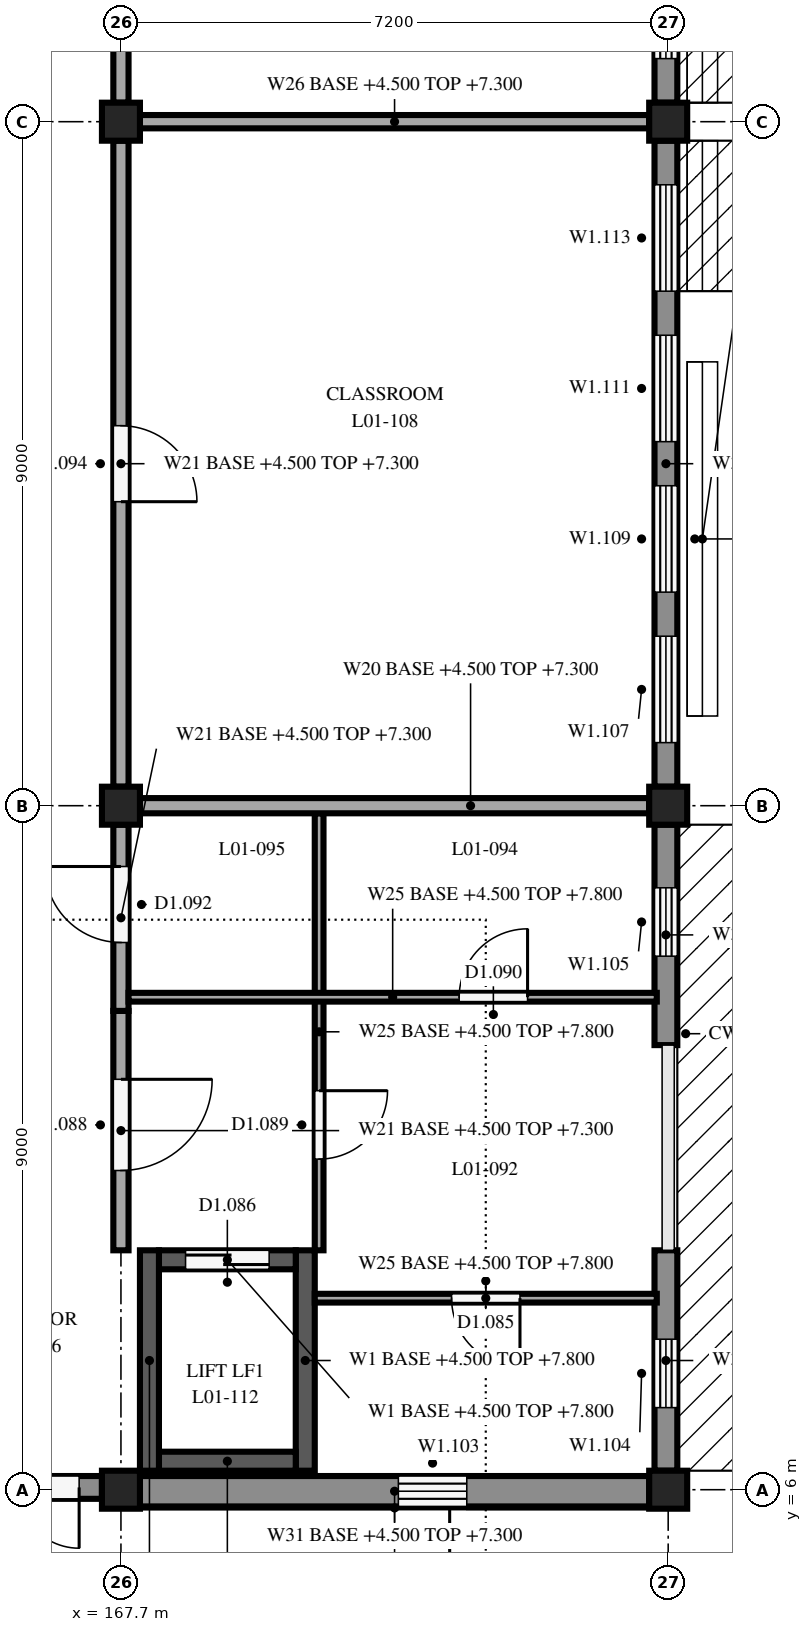
"""IFC4 building model, lengths in metres.
Left out: names, types, materials, properties, quantities, classifications, styles, units other than length and angle.
Written with IfcOpenShell. Run it as: python <this file> out.ifc"""

import sys

from ifc_helpers import new_model, si_unit, direction, frame, frame_2d, origin, origin_2d, place, context, subcontext, project, spatial, rectangle, extrude, element, fill, save


model = new_model("IFC4")
c1 = context("Model", 3, precision=1e-05, world=origin(), true_north=direction((0.0, 1.0)))
c2 = subcontext(c1, "Body", "Model", "MODEL_VIEW")
j1 = project(units=[si_unit("LENGTHUNIT", "METRE"), si_unit("PLANEANGLEUNIT", "RADIAN")], contexts=[c1])
p1 = place(None, origin())
s1 = spatial("IfcSite", under=j1, at=p1, CompositionType="ELEMENT")
p2 = place(p1, origin())
s2 = spatial("IfcBuilding", under=s1, at=p2, CompositionType="ELEMENT")
p3 = place(p2, frame((0.0, 0.0, 4.5)))
s3 = spatial("IfcBuildingStorey", under=s2, at=p3, CompositionType="ELEMENT", Elevation=4.5)
for number, where, z_axis, x_axis in (
    (1, (167.7, 6.0, 0.0), (0.0, 0.0, 1.0), (1.0, 0.0, 0.0)),
    (2, (167.7, 15.0, 0.0), (0.0, 0.0, 1.0), (1.0, 0.0, 0.0)),
    (3, (167.7, 24.0, 0.0), (0.0, 0.0, 1.0), (1.0, 0.0, 0.0)),
    (4, (174.9, 6.0, 0.0), (0.0, 0.0, 1.0), (1.0, 0.0, 0.0)),
    (5, (174.9, 15.0, 0.0), (0.0, 0.0, 1.0), (1.0, 0.0, 0.0)),
    (6, (174.9, 24.0, 0.0), (0.0, 0.0, 1.0), (1.0, 0.0, 0.0)),
):
    element("IfcColumn", number, at=place(p3, frame(where, z_axis=z_axis, x_axis=x_axis)), inside=s3, PredefinedType="COLUMN", context=c2, shape_type="SweptSolid", body=[
        extrude(rectangle(XDim=0.5, YDim=0.5, at=origin_2d()), origin(), (0.0, 0.0, 1.0), 3.3),
    ])
for number, where, z_axis, x_axis in (
    (7, (168.075, 6.25, 0.0), (0.0, 0.0, 1.0), (0.0, 1.0, 0.0)),
    (8, (170.125, 6.25, 0.0), (0.0, 0.0, 1.0), (0.0, 1.0, 0.0)),
):
    element("IfcWall", number, at=place(p3, frame(where, z_axis=z_axis, x_axis=x_axis)), inside=s3, PredefinedType="SHEAR", context=c2, shape_type="SweptSolid", body=[
        extrude(rectangle(XDim=2.9, YDim=0.25, at=frame_2d((1.45, 0.0))), origin(), (0.0, 0.0, 1.0), 3.3),
    ])
p4 = place(p3, frame((168.2, 6.375, 0.0), z_axis=(0.0, 0.0, 1.0), x_axis=(1.0, 0.0, 0.0)))
e9 = element("IfcWall", 9, at=p4, inside=s3, PredefinedType="SHEAR", context=c2, shape_type="SweptSolid", body=[
    extrude(rectangle(XDim=1.8, YDim=0.25, at=frame_2d((0.9, 0.0))), origin(), (0.0, 0.0, 1.0), 3.3),
])
p5 = place(p3, frame((168.2, 9.025, 0.0), z_axis=(0.0, 0.0, 1.0), x_axis=(1.0, 0.0, 0.0)))
e10 = element("IfcWall", 10, at=p5, inside=s3, PredefinedType="SHEAR", context=c2, shape_type="SweptSolid", body=[
    extrude(rectangle(XDim=1.8, YDim=0.25, at=frame_2d((0.9, 0.0))), origin(), (0.0, 0.0, 1.0), 3.3),
])
p6 = place(p5, frame((0.35, 0.0, 0.0)))
e11 = element("IfcOpeningElement", 11, at=p6, cuts=e10, PredefinedType="OPENING", context=c2, shape_type="SweptSolid", body=[
    extrude(rectangle(XDim=1.1, YDim=2.1, at=frame_2d((0.55, 1.05))), frame((0.0, 0.135, 0.0), z_axis=(0.0, -1.0, 0.0), x_axis=(1.0, 0.0, 0.0)), (0.0, 0.0, 1.0), 0.27),
])
p7 = place(p3, frame((174.87, 9.15, 0.0), z_axis=(0.0, 0.0, 1.0), x_axis=(0.0, -1.0, 0.0)))
e12 = element("IfcWall", 12, at=p7, inside=s3, PredefinedType="STANDARD", context=c2, shape_type="SweptSolid", body=[
    extrude(rectangle(XDim=2.9, YDim=0.3, at=frame_2d((1.45, 0.0))), origin(), (0.0, 0.0, 1.0), 2.75),
])
p8 = place(p7, frame((1.17, 0.0, 1.6)))
e13 = element("IfcOpeningElement", 13, at=p8, cuts=e12, PredefinedType="OPENING", context=c2, shape_type="SweptSolid", body=[
    extrude(rectangle(XDim=0.9, YDim=1.0, at=frame_2d((0.45, 0.5))), frame((0.0, 0.16, 0.0), z_axis=(0.0, -1.0, 0.0), x_axis=(1.0, 0.0, 0.0)), (0.0, 0.0, 1.0), 0.32),
])
p9 = place(p3, frame((174.87, 14.75, 0.0), z_axis=(0.0, 0.0, 1.0), x_axis=(0.0, -1.0, 0.0)))
e14 = element("IfcWall", 14, at=p9, inside=s3, PredefinedType="STANDARD", context=c2, shape_type="SweptSolid", body=[
    extrude(rectangle(XDim=2.9, YDim=0.3, at=frame_2d((1.45, 0.0))), origin(), (0.0, 0.0, 1.0), 2.75),
])
p10 = place(p9, frame((0.83, 0.0, 1.6)))
e15 = element("IfcOpeningElement", 15, at=p10, cuts=e14, PredefinedType="OPENING", context=c2, shape_type="SweptSolid", body=[
    extrude(rectangle(XDim=0.9, YDim=1.0, at=frame_2d((0.45, 0.5))), frame((0.0, 0.16, 0.0), z_axis=(0.0, -1.0, 0.0), x_axis=(1.0, 0.0, 0.0)), (0.0, 0.0, 1.0), 0.32),
])
p11 = place(p3, frame((174.87, 23.75, 0.0), z_axis=(0.0, 0.0, 1.0), x_axis=(0.0, -1.0, 0.0)))
e16 = element("IfcWall", 16, at=p11, inside=s3, PredefinedType="STANDARD", context=c2, shape_type="SweptSolid", body=[
    extrude(rectangle(XDim=8.5, YDim=0.3, at=frame_2d((4.25, 0.0))), origin(), (0.0, 0.0, 1.0), 2.75),
])
p12 = place(p11, frame((6.52, 0.0, 0.6)))
e17 = element("IfcOpeningElement", 17, at=p12, cuts=e16, PredefinedType="OPENING", context=c2, shape_type="SweptSolid", body=[
    extrude(rectangle(XDim=1.4, YDim=2.1, at=frame_2d((0.7, 1.05))), frame((0.0, 0.16, 0.0), z_axis=(0.0, -1.0, 0.0), x_axis=(1.0, 0.0, 0.0)), (0.0, 0.0, 1.0), 0.32),
])
p13 = place(p11, frame((4.54, 0.0, 0.6)))
e18 = element("IfcOpeningElement", 18, at=p13, cuts=e16, PredefinedType="OPENING", context=c2, shape_type="SweptSolid", body=[
    extrude(rectangle(XDim=1.4, YDim=2.1, at=frame_2d((0.7, 1.05))), frame((0.0, 0.16, 0.0), z_axis=(0.0, -1.0, 0.0), x_axis=(1.0, 0.0, 0.0)), (0.0, 0.0, 1.0), 0.32),
])
p14 = place(p11, frame((2.56, 0.0, 0.6)))
e19 = element("IfcOpeningElement", 19, at=p14, cuts=e16, PredefinedType="OPENING", context=c2, shape_type="SweptSolid", body=[
    extrude(rectangle(XDim=1.4, YDim=2.1, at=frame_2d((0.7, 1.05))), frame((0.0, 0.16, 0.0), z_axis=(0.0, -1.0, 0.0), x_axis=(1.0, 0.0, 0.0)), (0.0, 0.0, 1.0), 0.32),
])
p15 = place(p11, frame((0.58, 0.0, 0.6)))
e20 = element("IfcOpeningElement", 20, at=p15, cuts=e16, PredefinedType="OPENING", context=c2, shape_type="SweptSolid", body=[
    extrude(rectangle(XDim=1.4, YDim=2.1, at=frame_2d((0.7, 1.05))), frame((0.0, 0.16, 0.0), z_axis=(0.0, -1.0, 0.0), x_axis=(1.0, 0.0, 0.0)), (0.0, 0.0, 1.0), 0.32),
])
p16 = place(p3, frame((174.87, 32.75, 0.0), z_axis=(0.0, 0.0, 1.0), x_axis=(0.0, -1.0, 0.0)))
e21 = element("IfcWall", 21, at=p16, inside=s3, PredefinedType="STANDARD", context=c2, shape_type="SweptSolid", body=[
    extrude(rectangle(XDim=8.5, YDim=0.3, at=frame_2d((4.25, 0.0))), origin(), (0.0, 0.0, 1.0), 2.75),
])
p17 = place(p16, frame((6.52, 0.0, 0.3)))
e22 = element("IfcOpeningElement", 22, at=p17, cuts=e21, PredefinedType="OPENING", context=c2, shape_type="SweptSolid", body=[
    extrude(rectangle(XDim=1.4, YDim=2.4, at=frame_2d((0.7, 1.2))), frame((0.0, 0.16, 0.0), z_axis=(0.0, -1.0, 0.0), x_axis=(1.0, 0.0, 0.0)), (0.0, 0.0, 1.0), 0.32),
])
p18 = place(p16, frame((4.54, 0.0, 0.3)))
e23 = element("IfcOpeningElement", 23, at=p18, cuts=e21, PredefinedType="OPENING", context=c2, shape_type="SweptSolid", body=[
    extrude(rectangle(XDim=1.4, YDim=2.4, at=frame_2d((0.7, 1.2))), frame((0.0, 0.16, 0.0), z_axis=(0.0, -1.0, 0.0), x_axis=(1.0, 0.0, 0.0)), (0.0, 0.0, 1.0), 0.32),
])
p19 = place(p16, frame((2.56, 0.0, 0.3)))
e24 = element("IfcOpeningElement", 24, at=p19, cuts=e21, PredefinedType="OPENING", context=c2, shape_type="SweptSolid", body=[
    extrude(rectangle(XDim=1.4, YDim=2.4, at=frame_2d((0.7, 1.2))), frame((0.0, 0.16, 0.0), z_axis=(0.0, -1.0, 0.0), x_axis=(1.0, 0.0, 0.0)), (0.0, 0.0, 1.0), 0.32),
])
p20 = place(p16, frame((0.58, 0.0, 0.3)))
e25 = element("IfcOpeningElement", 25, at=p20, cuts=e21, PredefinedType="OPENING", context=c2, shape_type="SweptSolid", body=[
    extrude(rectangle(XDim=1.4, YDim=2.4, at=frame_2d((0.7, 1.2))), frame((0.0, 0.16, 0.0), z_axis=(0.0, -1.0, 0.0), x_axis=(1.0, 0.0, 0.0)), (0.0, 0.0, 1.0), 0.32),
])
p21 = place(p3, frame((167.45, 6.03, 0.0), z_axis=(0.0, 0.0, 1.0), x_axis=(-1.0, 0.0, 0.0)))
e26 = element("IfcWall", 26, at=p21, inside=s3, PredefinedType="STANDARD", context=c2, shape_type="SweptSolid", body=[
    extrude(rectangle(XDim=2.2, YDim=0.3, at=frame_2d((1.1, 0.0))), origin(), (0.0, 0.0, 1.0), 2.9),
])
p22 = place(p21, frame((0.3, 0.0, 0.0)))
e27 = element("IfcOpeningElement", 27, at=p22, cuts=e26, PredefinedType="OPENING", context=c2, shape_type="SweptSolid", body=[
    extrude(rectangle(XDim=1.6, YDim=2.4, at=frame_2d((0.8, 1.2))), frame((0.0, 0.16, 0.0), z_axis=(0.0, -1.0, 0.0), x_axis=(1.0, 0.0, 0.0)), (0.0, 0.0, 1.0), 0.32),
])
p23 = place(p3, frame((174.65, 5.98, 0.0), z_axis=(0.0, 0.0, 1.0), x_axis=(-1.0, 0.0, 0.0)))
e28 = element("IfcWall", 28, at=p23, inside=s3, PredefinedType="STANDARD", context=c2, shape_type="SweptSolid", body=[
    extrude(rectangle(XDim=6.7, YDim=0.4, at=frame_2d((3.35, 0.0))), origin(), (0.0, 0.0, 1.0), 2.8),
])
p24 = place(p23, frame((2.4, 0.0, 1.6)))
e29 = element("IfcOpeningElement", 29, at=p24, cuts=e28, PredefinedType="OPENING", context=c2, shape_type="SweptSolid", body=[
    extrude(rectangle(XDim=0.9, YDim=1.0, at=frame_2d((0.45, 0.5))), frame((0.0, 0.21, 0.0), z_axis=(0.0, -1.0, 0.0), x_axis=(1.0, 0.0, 0.0)), (0.0, 0.0, 1.0), 0.42),
])
p25 = place(p3, frame((167.7, 12.3, 0.0), z_axis=(0.0, 0.0, 1.0), x_axis=(0.0, -1.0, 0.0)))
e30 = element("IfcWall", 30, at=p25, inside=s3, PredefinedType="PARTITIONING", context=c2, shape_type="SweptSolid", body=[
    extrude(rectangle(XDim=3.15, YDim=0.2, at=frame_2d((1.575, 0.0))), origin(), (0.0, 0.0, 1.0), 2.8),
])
p26 = place(p25, frame((0.9, 0.0, 0.0)))
e31 = element("IfcOpeningElement", 31, at=p26, cuts=e30, PredefinedType="OPENING", context=c2, shape_type="SweptSolid", body=[
    extrude(rectangle(XDim=1.2, YDim=2.1, at=frame_2d((0.6, 1.05))), frame((0.0, 0.11, 0.0), z_axis=(0.0, -1.0, 0.0), x_axis=(1.0, 0.0, 0.0)), (0.0, 0.0, 1.0), 0.22),
])
p27 = place(p3, frame((167.7, 12.3, 0.0), z_axis=(0.0, 0.0, 1.0), x_axis=(0.0, 1.0, 0.0)))
e32 = element("IfcWall", 32, at=p27, inside=s3, PredefinedType="PARTITIONING", context=c2, shape_type="SweptSolid", body=[
    extrude(rectangle(XDim=2.45, YDim=0.2, at=frame_2d((1.225, 0.0))), origin(), (0.0, 0.0, 1.0), 2.8),
])
p28 = place(p27, frame((0.9, 0.0, 0.0)))
e33 = element("IfcOpeningElement", 33, at=p28, cuts=e32, PredefinedType="OPENING", context=c2, shape_type="SweptSolid", body=[
    extrude(rectangle(XDim=1.0, YDim=2.1, at=frame_2d((0.5, 1.05))), frame((0.0, 0.11, 0.0), z_axis=(0.0, -1.0, 0.0), x_axis=(1.0, 0.0, 0.0)), (0.0, 0.0, 1.0), 0.22),
])
p29 = place(p3, frame((167.95, 15.0, 0.0), z_axis=(0.0, 0.0, 1.0), x_axis=(1.0, 0.0, 0.0)))
e34 = element("IfcWall", 34, at=p29, inside=s3, PredefinedType="PARTITIONING", context=c2, shape_type="SweptSolid", body=[
    extrude(rectangle(XDim=6.7, YDim=0.2, at=frame_2d((3.35, 0.0))), origin(), (0.0, 0.0, 1.0), 2.8),
])
p30 = place(p3, frame((170.308, 14.9, 0.0), z_axis=(0.0, 0.0, 1.0), x_axis=(0.0, -1.0, 0.0)))
e35 = element("IfcWall", 35, at=p30, inside=s3, PredefinedType="PARTITIONING", context=c2, shape_type="SweptSolid", body=[
    extrude(rectangle(XDim=5.75, YDim=0.115, at=frame_2d((2.875, 0.0))), origin(), (0.0, 0.0, 1.0), 3.3),
])
p31 = place(p30, frame((3.65, 0.0, 0.0)))
e36 = element("IfcOpeningElement", 36, at=p31, cuts=e35, PredefinedType="OPENING", context=c2, shape_type="SweptSolid", body=[
    extrude(rectangle(XDim=0.9, YDim=2.1, at=frame_2d((0.45, 1.05))), frame((0.0, 0.067, 0.0), z_axis=(0.0, -1.0, 0.0), x_axis=(1.0, 0.0, 0.0)), (0.0, 0.0, 1.0), 0.135),
])
p32 = place(p3, frame((174.75, 8.52, 0.0), z_axis=(0.0, 0.0, 1.0), x_axis=(-1.0, 0.0, 0.0)))
e37 = element("IfcWall", 37, at=p32, inside=s3, PredefinedType="PARTITIONING", context=c2, shape_type="SweptSolid", body=[
    extrude(rectangle(XDim=4.5, YDim=0.115, at=frame_2d((2.25, 0.0))), origin(), (0.0, 0.0, 1.0), 3.3),
])
p33 = place(p32, frame((1.8, 0.0, 0.0)))
e38 = element("IfcOpeningElement", 38, at=p33, cuts=e37, PredefinedType="OPENING", context=c2, shape_type="SweptSolid", body=[
    extrude(rectangle(XDim=0.9, YDim=2.1, at=frame_2d((0.45, 1.05))), frame((0.0, 0.067, 0.0), z_axis=(0.0, -1.0, 0.0), x_axis=(1.0, 0.0, 0.0)), (0.0, 0.0, 1.0), 0.135),
])
p34 = place(p3, frame((167.8, 12.48, 0.0), z_axis=(0.0, 0.0, 1.0), x_axis=(1.0, 0.0, 0.0)))
e39 = element("IfcWall", 39, at=p34, inside=s3, PredefinedType="PARTITIONING", context=c2, shape_type="SweptSolid", body=[
    extrude(rectangle(XDim=6.95, YDim=0.115, at=frame_2d((3.475, 0.0))), origin(), (0.0, 0.0, 1.0), 3.3),
])
p35 = place(p34, frame((4.35, 0.0, 0.0)))
e40 = element("IfcOpeningElement", 40, at=p35, cuts=e39, PredefinedType="OPENING", context=c2, shape_type="SweptSolid", body=[
    extrude(rectangle(XDim=0.9, YDim=2.1, at=frame_2d((0.45, 1.05))), frame((0.0, 0.067, 0.0), z_axis=(0.0, -1.0, 0.0), x_axis=(1.0, 0.0, 0.0)), (0.0, 0.0, 1.0), 0.135),
])
p36 = place(p3, frame((167.7, 23.75, 0.0), z_axis=(0.0, 0.0, 1.0), x_axis=(0.0, -1.0, 0.0)))
e41 = element("IfcWall", 41, at=p36, inside=s3, PredefinedType="PARTITIONING", context=c2, shape_type="SweptSolid", body=[
    extrude(rectangle(XDim=8.5, YDim=0.2, at=frame_2d((4.25, 0.0))), origin(), (0.0, 0.0, 1.0), 2.8),
])
p37 = place(p36, frame((3.75, 0.0, 0.0)))
e42 = element("IfcOpeningElement", 42, at=p37, cuts=e41, PredefinedType="OPENING", context=c2, shape_type="SweptSolid", body=[
    extrude(rectangle(XDim=1.0, YDim=2.1, at=frame_2d((0.5, 1.05))), frame((0.0, 0.11, 0.0), z_axis=(0.0, -1.0, 0.0), x_axis=(1.0, 0.0, 0.0)), (0.0, 0.0, 1.0), 0.22),
])
p38 = place(p3, frame((167.7, 32.75, 0.0), z_axis=(0.0, 0.0, 1.0), x_axis=(0.0, -1.0, 0.0)))
e43 = element("IfcWall", 43, at=p38, inside=s3, PredefinedType="PARTITIONING", context=c2, shape_type="SweptSolid", body=[
    extrude(rectangle(XDim=8.5, YDim=0.2, at=frame_2d((4.25, 0.0))), origin(), (0.0, 0.0, 1.0), 2.8),
])
p39 = place(p38, frame((3.5, 0.0, 0.0)))
e44 = element("IfcOpeningElement", 44, at=p39, cuts=e43, PredefinedType="OPENING", context=c2, shape_type="SweptSolid", body=[
    extrude(rectangle(XDim=1.5, YDim=2.1, at=frame_2d((0.75, 1.05))), frame((0.0, 0.11, 0.0), z_axis=(0.0, -1.0, 0.0), x_axis=(1.0, 0.0, 0.0)), (0.0, 0.0, 1.0), 0.22),
])
p40 = place(p3, frame((167.95, 24.0, 0.0), z_axis=(0.0, 0.0, 1.0), x_axis=(1.0, 0.0, 0.0)))
e45 = element("IfcWall", 45, at=p40, inside=s3, PredefinedType="PARTITIONING", context=c2, shape_type="SweptSolid", body=[
    extrude(rectangle(XDim=6.7, YDim=0.175, at=frame_2d((3.35, 0.0))), origin(), (0.0, 0.0, 1.0), 2.8),
])
p41 = place(p8, origin())
e46 = element("IfcWindow", 46, at=p41, inside=s3, PartitioningType="SINGLE_PANEL", PredefinedType="WINDOW", context=c2, shape_type="SweptSolid", body=[
    extrude(rectangle(XDim=0.9, YDim=1.0, at=frame_2d((0.45, 0.5))), frame((0.0, 0.03, 0.0), z_axis=(0.0, -1.0, 0.0), x_axis=(1.0, 0.0, 0.0)), (0.0, 0.0, 1.0), 0.06),
])
fill(e13, e46)
p42 = place(p10, origin())
e47 = element("IfcWindow", 47, at=p42, inside=s3, PartitioningType="SINGLE_PANEL", PredefinedType="WINDOW", context=c2, shape_type="SweptSolid", body=[
    extrude(rectangle(XDim=0.9, YDim=1.0, at=frame_2d((0.45, 0.5))), frame((0.0, 0.03, 0.0), z_axis=(0.0, -1.0, 0.0), x_axis=(1.0, 0.0, 0.0)), (0.0, 0.0, 1.0), 0.06),
])
fill(e15, e47)
p43 = place(p12, origin())
e48 = element("IfcWindow", 48, at=p43, inside=s3, PartitioningType="DOUBLE_PANEL_VERTICAL", PredefinedType="WINDOW", context=c2, shape_type="SweptSolid", body=[
    extrude(rectangle(XDim=1.4, YDim=2.1, at=frame_2d((0.7, 1.05))), frame((0.0, 0.03, 0.0), z_axis=(0.0, -1.0, 0.0), x_axis=(1.0, 0.0, 0.0)), (0.0, 0.0, 1.0), 0.06),
])
fill(e17, e48)
p44 = place(p13, origin())
e49 = element("IfcWindow", 49, at=p44, inside=s3, PartitioningType="DOUBLE_PANEL_VERTICAL", PredefinedType="WINDOW", context=c2, shape_type="SweptSolid", body=[
    extrude(rectangle(XDim=1.4, YDim=2.1, at=frame_2d((0.7, 1.05))), frame((0.0, 0.03, 0.0), z_axis=(0.0, -1.0, 0.0), x_axis=(1.0, 0.0, 0.0)), (0.0, 0.0, 1.0), 0.06),
])
fill(e18, e49)
p45 = place(p14, origin())
e50 = element("IfcWindow", 50, at=p45, inside=s3, PartitioningType="DOUBLE_PANEL_VERTICAL", PredefinedType="WINDOW", context=c2, shape_type="SweptSolid", body=[
    extrude(rectangle(XDim=1.4, YDim=2.1, at=frame_2d((0.7, 1.05))), frame((0.0, 0.03, 0.0), z_axis=(0.0, -1.0, 0.0), x_axis=(1.0, 0.0, 0.0)), (0.0, 0.0, 1.0), 0.06),
])
fill(e19, e50)
p46 = place(p15, origin())
e51 = element("IfcWindow", 51, at=p46, inside=s3, PartitioningType="DOUBLE_PANEL_VERTICAL", PredefinedType="WINDOW", context=c2, shape_type="SweptSolid", body=[
    extrude(rectangle(XDim=1.4, YDim=2.1, at=frame_2d((0.7, 1.05))), frame((0.0, 0.03, 0.0), z_axis=(0.0, -1.0, 0.0), x_axis=(1.0, 0.0, 0.0)), (0.0, 0.0, 1.0), 0.06),
])
fill(e20, e51)
p47 = place(p17, origin())
e52 = element("IfcWindow", 52, at=p47, inside=s3, PartitioningType="DOUBLE_PANEL_VERTICAL", PredefinedType="WINDOW", context=c2, shape_type="SweptSolid", body=[
    extrude(rectangle(XDim=1.4, YDim=2.4, at=frame_2d((0.7, 1.2))), frame((0.0, 0.03, 0.0), z_axis=(0.0, -1.0, 0.0), x_axis=(1.0, 0.0, 0.0)), (0.0, 0.0, 1.0), 0.06),
])
fill(e22, e52)
p48 = place(p22, origin())
e53 = element("IfcDoor", 53, at=p48, inside=s3, OperationType="DOUBLE_DOOR_SINGLE_SWING", PredefinedType="DOOR", context=c2, shape_type="SweptSolid", body=[
    extrude(rectangle(XDim=1.6, YDim=2.4, at=frame_2d((0.8, 1.2))), frame((0.0, 0.025, 0.0), z_axis=(0.0, -1.0, 0.0), x_axis=(1.0, 0.0, 0.0)), (0.0, 0.0, 1.0), 0.05),
])
fill(e27, e53)
p49 = place(p24, origin())
e54 = element("IfcWindow", 54, at=p49, inside=s3, PartitioningType="SINGLE_PANEL", PredefinedType="WINDOW", context=c2, shape_type="SweptSolid", body=[
    extrude(rectangle(XDim=0.9, YDim=1.0, at=frame_2d((0.45, 0.5))), frame((0.0, 0.03, 0.0), z_axis=(0.0, -1.0, 0.0), x_axis=(1.0, 0.0, 0.0)), (0.0, 0.0, 1.0), 0.06),
])
fill(e29, e54)
p50 = place(p26, origin())
e55 = element("IfcDoor", 55, at=p50, inside=s3, OperationType="SINGLE_SWING_LEFT", PredefinedType="DOOR", context=c2, shape_type="SweptSolid", body=[
    extrude(rectangle(XDim=1.2, YDim=2.1, at=frame_2d((0.6, 1.05))), frame((0.0, 0.025, 0.0), z_axis=(0.0, -1.0, 0.0), x_axis=(1.0, 0.0, 0.0)), (0.0, 0.0, 1.0), 0.05),
])
fill(e31, e55)
p51 = place(p28, origin())
e56 = element("IfcDoor", 56, at=p51, inside=s3, OperationType="SINGLE_SWING_RIGHT", PredefinedType="DOOR", context=c2, shape_type="SweptSolid", body=[
    extrude(rectangle(XDim=1.0, YDim=2.1, at=frame_2d((0.5, 1.05))), frame((0.0, 0.025, 0.0), z_axis=(0.0, -1.0, 0.0), x_axis=(1.0, 0.0, 0.0)), (0.0, 0.0, 1.0), 0.05),
])
fill(e33, e56)
p52 = place(p31, origin())
e57 = element("IfcDoor", 57, at=p52, inside=s3, OperationType="SINGLE_SWING_LEFT", PredefinedType="DOOR", context=c2, shape_type="SweptSolid", body=[
    extrude(rectangle(XDim=0.9, YDim=2.1, at=frame_2d((0.45, 1.05))), frame((0.0, 0.025, 0.0), z_axis=(0.0, -1.0, 0.0), x_axis=(1.0, 0.0, 0.0)), (0.0, 0.0, 1.0), 0.05),
])
fill(e36, e57)
p53 = place(p33, origin())
e58 = element("IfcDoor", 58, at=p53, inside=s3, OperationType="SINGLE_SWING_LEFT", PredefinedType="DOOR", context=c2, shape_type="SweptSolid", body=[
    extrude(rectangle(XDim=0.9, YDim=2.1, at=frame_2d((0.45, 1.05))), frame((0.0, 0.025, 0.0), z_axis=(0.0, -1.0, 0.0), x_axis=(1.0, 0.0, 0.0)), (0.0, 0.0, 1.0), 0.05),
])
fill(e38, e58)
p54 = place(p35, origin())
e59 = element("IfcDoor", 59, at=p54, inside=s3, OperationType="SINGLE_SWING_RIGHT", PredefinedType="DOOR", context=c2, shape_type="SweptSolid", body=[
    extrude(rectangle(XDim=0.9, YDim=2.1, at=frame_2d((0.45, 1.05))), frame((0.0, 0.025, 0.0), z_axis=(0.0, -1.0, 0.0), x_axis=(1.0, 0.0, 0.0)), (0.0, 0.0, 1.0), 0.05),
])
fill(e40, e59)
p55 = place(p37, origin())
e60 = element("IfcDoor", 60, at=p55, inside=s3, OperationType="SINGLE_SWING_RIGHT", PredefinedType="DOOR", context=c2, shape_type="SweptSolid", body=[
    extrude(rectangle(XDim=1.0, YDim=2.1, at=frame_2d((0.5, 1.05))), frame((0.0, 0.025, 0.0), z_axis=(0.0, -1.0, 0.0), x_axis=(1.0, 0.0, 0.0)), (0.0, 0.0, 1.0), 0.05),
])
fill(e42, e60)
p56 = place(p6, origin())
e61 = element("IfcDoor", 61, at=p56, inside=s3, OperationType="SLIDING_TO_LEFT", PredefinedType="DOOR", context=c2, shape_type="SweptSolid", body=[
    extrude(rectangle(XDim=1.1, YDim=2.1, at=frame_2d((0.55, 1.05))), frame((0.0, 0.025, 0.0), z_axis=(0.0, -1.0, 0.0), x_axis=(1.0, 0.0, 0.0)), (0.0, 0.0, 1.0), 0.05),
])
fill(e11, e61)
save(model, sys.argv[1])
